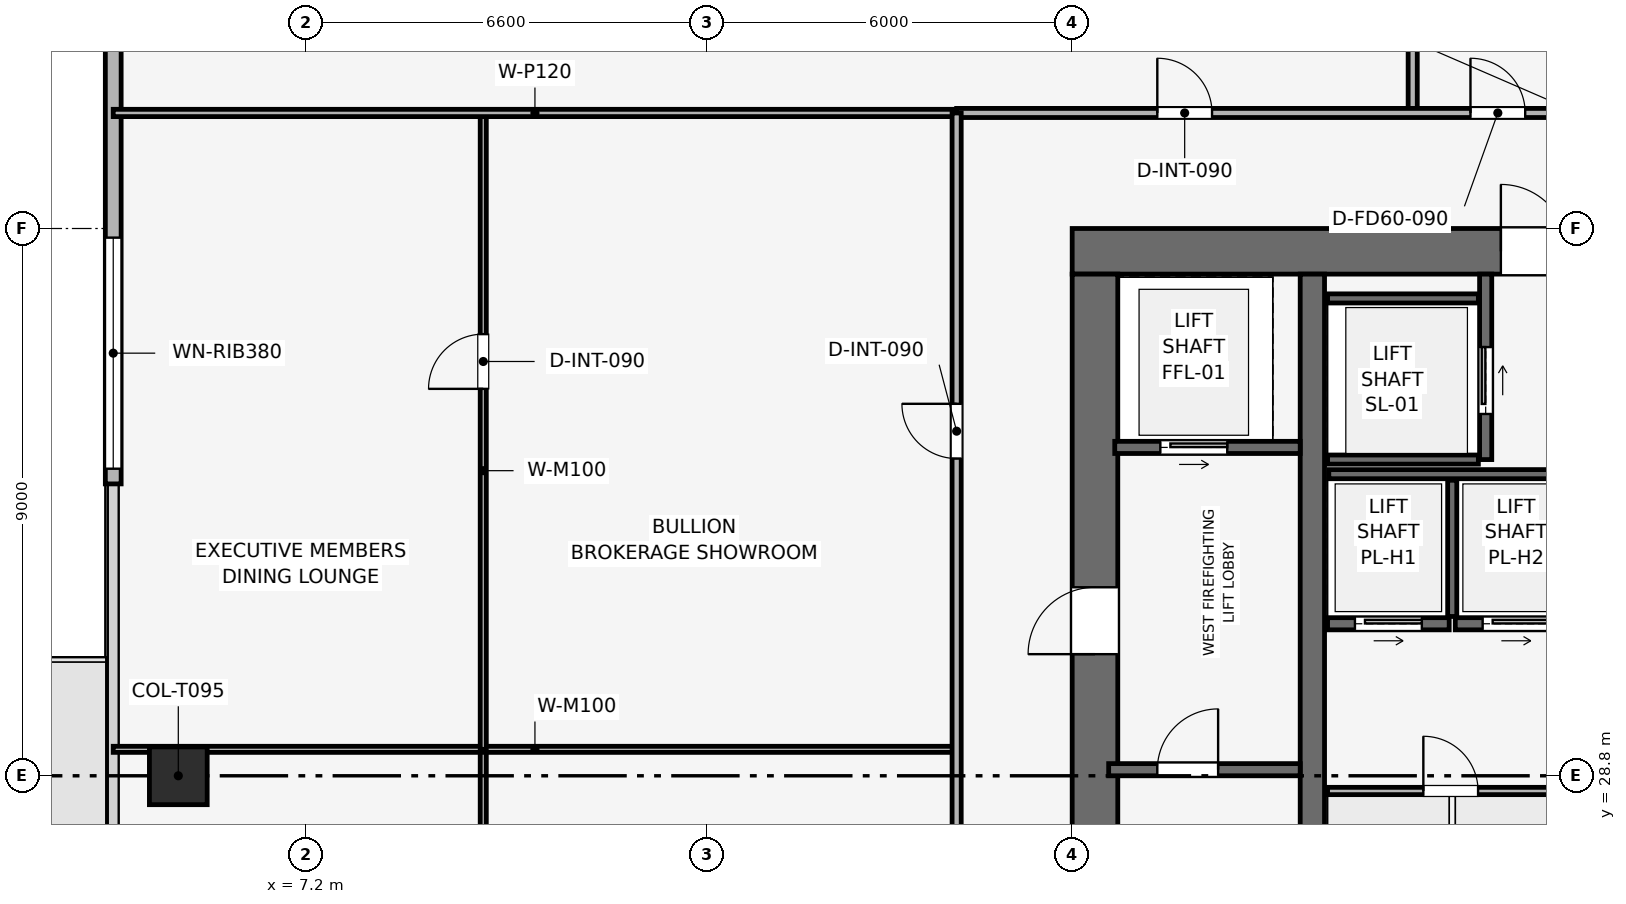
"""IFC4 building model, lengths in metres.
Left out: names, types, materials, properties, quantities, classifications, styles, units other than length and angle.
Written with IfcOpenShell. Run it as: python <this file> out.ifc"""

import sys

from ifc_helpers import new_model, si_unit, direction, frame, frame_2d, origin, origin_2d, place, context, subcontext, project, spatial, rectangle, extrude, element, fill, save


model = new_model("IFC4")
c1 = context("Model", 3, precision=1e-05, world=origin(), true_north=direction((0.0, 1.0)))
c2 = subcontext(c1, "Body", "Model", "MODEL_VIEW")
j1 = project(units=[si_unit("LENGTHUNIT", "METRE"), si_unit("PLANEANGLEUNIT", "RADIAN")], contexts=[c1])
p1 = place(None, origin())
s1 = spatial("IfcSite", under=j1, at=p1, CompositionType="ELEMENT")
p2 = place(p1, origin())
s2 = spatial("IfcBuilding", under=s1, at=p2, CompositionType="ELEMENT")
p3 = place(p2, frame((0.0, 0.0, 257.85)))
s3 = spatial("IfcBuildingStorey", under=s2, at=p3, CompositionType="ELEMENT", Elevation=257.85)
p4 = place(p3, frame((19.8, 37.425, 0.0), z_axis=(0.0, 0.0, 1.0), x_axis=(1.0, 0.0, 0.0)))
e1 = element("IfcWall", 1, at=p4, inside=s3, PredefinedType="SHEAR", context=c2, shape_type="SweptSolid", body=[
    extrude(rectangle(XDim=18.0, YDim=0.75, at=frame_2d((9.0, 0.0))), origin(), (0.0, 0.0, 1.0), 3.75),
])
p5 = place(p4, frame((7.05, 0.0, 0.0)))
e2 = element("IfcOpeningElement", 2, at=p5, cuts=e1, PredefinedType="OPENING", context=c2, shape_type="SweptSolid", body=[
    extrude(rectangle(XDim=1.1, YDim=2.15, at=frame_2d((0.55, 1.075))), frame((0.0, 0.385, 0.0), z_axis=(0.0, -1.0, 0.0), x_axis=(1.0, 0.0, 0.0)), (0.0, 0.0, 1.0), 0.77),
])
p6 = place(p3, frame((20.175, 20.55, 0.0), z_axis=(0.0, 0.0, 1.0), x_axis=(0.0, 1.0, 0.0)))
e3 = element("IfcWall", 3, at=p6, inside=s3, PredefinedType="SHEAR", context=c2, shape_type="SweptSolid", body=[
    extrude(rectangle(XDim=16.5, YDim=0.75, at=frame_2d((8.25, 0.0))), origin(), (0.0, 0.0, 1.0), 3.75),
])
p7 = place(p6, frame((10.25, 0.0, 0.0)))
e4 = element("IfcOpeningElement", 4, at=p7, cuts=e3, PredefinedType="OPENING", context=c2, shape_type="SweptSolid", body=[
    extrude(rectangle(XDim=1.1, YDim=2.15, at=frame_2d((0.55, 1.075))), frame((0.0, 0.385, 0.0), z_axis=(0.0, -1.0, 0.0), x_axis=(1.0, 0.0, 0.0)), (0.0, 0.0, 1.0), 0.77),
])
p8 = place(p3, frame((23.75, 20.55, 0.0), z_axis=(0.0, 0.0, 1.0), x_axis=(0.0, 1.0, 0.0)))
e5 = element("IfcWall", 5, at=p8, inside=s3, PredefinedType="SHEAR", context=c2, shape_type="SweptSolid", body=[
    extrude(rectangle(XDim=16.5, YDim=0.4, at=frame_2d((8.25, 0.0))), origin(), (0.0, 0.0, 1.0), 3.75),
])
p9 = place(p3, frame((5.1, 28.8, 0.003), z_axis=(0.0, 0.0, 1.0), x_axis=(1.0, 0.0, 0.0)))
e6 = element("IfcColumn", 6, at=p9, inside=s3, PredefinedType="COLUMN", context=c2, shape_type="SweptSolid", body=[
    extrude(rectangle(XDim=0.95, YDim=0.95, at=origin_2d()), origin(), (0.0, 0.0, 1.0), 3.494),
])
p10 = place(p3, frame((4.03, 33.6, 0.0), z_axis=(0.0, 0.0, 1.0), x_axis=(0.0, 1.0, 0.0)))
e7 = element("IfcWall", 7, at=p10, inside=s3, PredefinedType="SOLIDWALL", context=c2, shape_type="SweptSolid", body=[
    extrude(rectangle(XDim=13.2, YDim=0.26, at=frame_2d((6.6, 0.0))), origin(), (0.0, 0.0, 1.0), 3.5),
])
p11 = place(p10, frame((0.25, 0.0, 0.9)))
e8 = element("IfcOpeningElement", 8, at=p11, cuts=e7, PredefinedType="OPENING", context=c2, shape_type="SweptSolid", body=[
    extrude(rectangle(XDim=3.8, YDim=1.9, at=frame_2d((1.9, 0.95))), frame((0.0, 0.14, 0.0), z_axis=(0.0, -1.0, 0.0), x_axis=(1.0, 0.0, 0.0)), (0.0, 0.0, 1.0), 0.28),
])
p12 = place(p3, frame((20.4, 28.9, 0.0), z_axis=(0.0, 0.0, 1.0), x_axis=(1.0, 0.0, 0.0)))
e9 = element("IfcWall", 9, at=p12, inside=s3, PredefinedType="SHEAR", context=c2, shape_type="SweptSolid", body=[
    extrude(rectangle(XDim=3.15, YDim=0.2, at=frame_2d((1.575, 0.0))), origin(), (0.0, 0.0, 1.0), 3.5),
])
p13 = place(p12, frame((0.8, 0.0, 0.0)))
e10 = element("IfcOpeningElement", 10, at=p13, cuts=e9, PredefinedType="OPENING", context=c2, shape_type="SweptSolid", body=[
    extrude(rectangle(XDim=1.0, YDim=2.1, at=frame_2d((0.5, 1.05))), frame((0.0, 0.11, 0.0), z_axis=(0.0, -1.0, 0.0), x_axis=(1.0, 0.0, 0.0)), (0.0, 0.0, 1.0), 0.22),
])
p14 = place(p3, frame((20.5, 34.2, 0.0), z_axis=(0.0, 0.0, 1.0), x_axis=(1.0, 0.0, 0.0)))
e11 = element("IfcWall", 11, at=p14, inside=s3, PredefinedType="SHEAR", context=c2, shape_type="SweptSolid", body=[
    extrude(rectangle(XDim=3.05, YDim=0.2, at=frame_2d((1.525, 0.0))), origin(), (0.0, 0.0, 1.0), 3.5),
])
p15 = place(p14, frame((0.75, 0.0, 0.0)))
e12 = element("IfcOpeningElement", 12, at=p15, cuts=e11, PredefinedType="OPENING", context=c2, shape_type="SweptSolid", body=[
    extrude(rectangle(XDim=1.1, YDim=2.15, at=frame_2d((0.55, 1.075))), frame((0.0, 0.11, 0.0), z_axis=(0.0, -1.0, 0.0), x_axis=(1.0, 0.0, 0.0)), (0.0, 0.0, 1.0), 0.22),
])
p16 = place(p3, frame((26.6, 34.0, 0.0), z_axis=(0.0, 0.0, 1.0), x_axis=(0.0, 1.0, 0.0)))
e13 = element("IfcWall", 13, at=p16, inside=s3, PredefinedType="SHEAR", context=c2, shape_type="SweptSolid", body=[
    extrude(rectangle(XDim=3.05, YDim=0.2, at=frame_2d((1.525, 0.0))), origin(), (0.0, 0.0, 1.0), 3.5),
])
p17 = place(p16, frame((0.75, 0.0, 0.0)))
e14 = element("IfcOpeningElement", 14, at=p17, cuts=e13, PredefinedType="OPENING", context=c2, shape_type="SweptSolid", body=[
    extrude(rectangle(XDim=1.1, YDim=2.15, at=frame_2d((0.55, 1.075))), frame((0.0, 0.11, 0.0), z_axis=(0.0, -1.0, 0.0), x_axis=(1.0, 0.0, 0.0)), (0.0, 0.0, 1.0), 0.22),
])
for number, where, z_axis, x_axis in (
    (15, (24.0, 34.0, 0.0), (0.0, 0.0, 1.0), (1.0, 0.0, 0.0)),
    (16, (24.0, 36.65, 0.0), (0.0, 0.0, 1.0), (1.0, 0.0, 0.0)),
):
    element("IfcWall", number, at=place(p3, frame(where, z_axis=z_axis, x_axis=x_axis)), inside=s3, PredefinedType="SHEAR", context=c2, shape_type="SweptSolid", body=[
        extrude(rectangle(XDim=2.48, YDim=0.15, at=frame_2d((1.24, 0.0))), origin(), (0.0, 0.0, 1.0), 3.5),
    ])
p18 = place(p3, frame((24.0, 31.3, 0.0), z_axis=(0.0, 0.0, 1.0), x_axis=(1.0, 0.0, 0.0)))
e17 = element("IfcWall", 17, at=p18, inside=s3, PredefinedType="SHEAR", context=c2, shape_type="SweptSolid", body=[
    extrude(rectangle(XDim=2.0, YDim=0.2, at=frame_2d((1.0, 0.0))), origin(), (0.0, 0.0, 1.0), 3.5),
])
p19 = place(p18, frame((0.45, 0.0, 0.0)))
e18 = element("IfcOpeningElement", 18, at=p19, cuts=e17, PredefinedType="OPENING", context=c2, shape_type="SweptSolid", body=[
    extrude(rectangle(XDim=1.1, YDim=2.15, at=frame_2d((0.55, 1.075))), frame((0.0, 0.11, 0.0), z_axis=(0.0, -1.0, 0.0), x_axis=(1.0, 0.0, 0.0)), (0.0, 0.0, 1.0), 0.22),
])
p20 = place(p3, frame((26.1, 31.3, 0.0), z_axis=(0.0, 0.0, 1.0), x_axis=(1.0, 0.0, 0.0)))
e19 = element("IfcWall", 19, at=p20, inside=s3, PredefinedType="SHEAR", context=c2, shape_type="SweptSolid", body=[
    extrude(rectangle(XDim=2.0, YDim=0.2, at=frame_2d((1.0, 0.0))), origin(), (0.0, 0.0, 1.0), 3.5),
])
p21 = place(p20, frame((0.45, 0.0, 0.0)))
e20 = element("IfcOpeningElement", 20, at=p21, cuts=e19, PredefinedType="OPENING", context=c2, shape_type="SweptSolid", body=[
    extrude(rectangle(XDim=1.1, YDim=2.15, at=frame_2d((0.55, 1.075))), frame((0.0, 0.11, 0.0), z_axis=(0.0, -1.0, 0.0), x_axis=(1.0, 0.0, 0.0)), (0.0, 0.0, 1.0), 0.22),
])
p22 = place(p3, frame((24.02, 33.76, 0.0), z_axis=(0.0, 0.0, 1.0), x_axis=(1.0, 0.0, 0.0)))
e21 = element("IfcWall", 21, at=p22, inside=s3, PredefinedType="SHEAR", context=c2, shape_type="SweptSolid", body=[
    extrude(rectangle(XDim=4.08, YDim=0.15, at=frame_2d((2.04, 0.0))), origin(), (0.0, 0.0, 1.0), 3.5),
])
p23 = place(p3, frame((26.05, 31.42, 0.0), z_axis=(0.0, 0.0, 1.0), x_axis=(0.0, 1.0, 0.0)))
e22 = element("IfcWall", 22, at=p23, inside=s3, PredefinedType="SHEAR", context=c2, shape_type="SweptSolid", body=[
    extrude(rectangle(XDim=2.24, YDim=0.15, at=frame_2d((1.12, 0.0))), origin(), (0.0, 0.0, 1.0), 3.5),
])
p24 = place(p3, frame((24.0, 28.55, 0.0), z_axis=(0.0, 0.0, 1.0), x_axis=(1.0, 0.0, 0.0)))
e23 = element("IfcWall", 23, at=p24, inside=s3, PredefinedType="PARTITIONING", context=c2, shape_type="SweptSolid", body=[
    extrude(rectangle(XDim=4.05, YDim=0.12, at=frame_2d((2.025, 0.0))), origin(), (0.0, 0.0, 1.0), 3.5),
])
p25 = place(p24, frame((1.575, 0.0, 0.0)))
e24 = element("IfcOpeningElement", 24, at=p25, cuts=e23, PredefinedType="OPENING", context=c2, shape_type="SweptSolid", body=[
    extrude(rectangle(XDim=0.9, YDim=2.1, at=frame_2d((0.45, 1.05))), frame((0.0, 0.07, 0.0), z_axis=(0.0, -1.0, 0.0), x_axis=(1.0, 0.0, 0.0)), (0.0, 0.0, 1.0), 0.14),
])
p26 = place(p3, frame((25.4, 39.7, 0.0), z_axis=(0.0, 0.0, 1.0), x_axis=(0.0, 1.0, 0.0)))
e25 = element("IfcWall", 25, at=p26, inside=s3, PredefinedType="PARTITIONING", context=c2, shape_type="SweptSolid", body=[
    extrude(rectangle(XDim=13.87, YDim=0.15, at=frame_2d((6.935, 0.0))), origin(), (0.0, 0.0, 1.0), 3.085),
])
p27 = place(p26, frame((8.035, 0.0, 0.0)))
e26 = element("IfcOpeningElement", 26, at=p27, cuts=e25, PredefinedType="OPENING", context=c2, shape_type="SweptSolid", body=[
    extrude(rectangle(XDim=0.9, YDim=2.1, at=frame_2d((0.45, 1.05))), frame((0.0, 0.085, 0.0), z_axis=(0.0, -1.0, 0.0), x_axis=(1.0, 0.0, 0.0)), (0.0, 0.0, 1.0), 0.17),
])
p28 = place(p3, frame((10.115, 21.304, 0.0), z_axis=(0.0, 0.0, 1.0), x_axis=(0.0, 1.0, 0.0)))
e27 = element("IfcWall", 27, at=p28, inside=s3, PredefinedType="MOVABLE", context=c2, shape_type="SweptSolid", body=[
    extrude(rectangle(XDim=7.931, YDim=0.1, at=frame_2d((3.966, 0.0))), origin(), (0.0, 0.0, 1.0), 3.085),
])
p29 = place(p28, frame((0.2, 0.0, 0.0)))
e28 = element("IfcOpeningElement", 28, at=p29, cuts=e27, PredefinedType="OPENING", context=c2, shape_type="SweptSolid", body=[
    extrude(rectangle(XDim=0.9, YDim=2.1, at=frame_2d((0.45, 1.05))), frame((0.0, 0.06, 0.0), z_axis=(0.0, -1.0, 0.0), x_axis=(1.0, 0.0, 0.0)), (0.0, 0.0, 1.0), 0.12),
])
p30 = place(p3, frame((4.03, 29.235, 0.0), z_axis=(0.0, 0.0, 1.0), x_axis=(1.0, 0.0, 0.0)))
e29 = element("IfcWall", 29, at=p30, inside=s3, PredefinedType="MOVABLE", context=c2, shape_type="SweptSolid", body=[
    extrude(rectangle(XDim=13.87, YDim=0.1, at=frame_2d((6.935, 0.0))), origin(), (0.0, 0.0, 1.0), 3.085),
])
p31 = place(p3, frame((10.115, 29.235, 0.0), z_axis=(0.0, 0.0, 1.0), x_axis=(0.0, 1.0, 0.0)))
e30 = element("IfcWall", 30, at=p31, inside=s3, PredefinedType="MOVABLE", context=c2, shape_type="SweptSolid", body=[
    extrude(rectangle(XDim=10.465, YDim=0.1, at=frame_2d((5.232, 0.0))), origin(), (0.0, 0.0, 1.0), 3.085),
])
p32 = place(p31, frame((5.928, 0.0, 0.0)))
e31 = element("IfcOpeningElement", 31, at=p32, cuts=e30, PredefinedType="OPENING", context=c2, shape_type="SweptSolid", body=[
    extrude(rectangle(XDim=0.9, YDim=2.1, at=frame_2d((0.45, 1.05))), frame((0.0, 0.06, 0.0), z_axis=(0.0, -1.0, 0.0), x_axis=(1.0, 0.0, 0.0)), (0.0, 0.0, 1.0), 0.12),
])
p33 = place(p3, frame((4.03, 39.7, 0.0), z_axis=(0.0, 0.0, 1.0), x_axis=(1.0, 0.0, 0.0)))
e32 = element("IfcWall", 32, at=p33, inside=s3, PredefinedType="PARTITIONING", context=c2, shape_type="SweptSolid", body=[
    extrude(rectangle(XDim=13.87, YDim=0.12, at=frame_2d((6.935, 0.0))), origin(), (0.0, 0.0, 1.0), 3.085),
])
p34 = place(p3, frame((17.9, 39.7, 0.0), z_axis=(0.0, 0.0, 1.0), x_axis=(1.0, 0.0, 0.0)))
e33 = element("IfcWall", 33, at=p34, inside=s3, PredefinedType="PARTITIONING", context=c2, shape_type="SweptSolid", body=[
    extrude(rectangle(XDim=21.8, YDim=0.15, at=frame_2d((10.9, 0.0))), origin(), (0.0, 0.0, 1.0), 3.085),
])
p35 = place(p34, frame((3.3, 0.0, 0.0)))
e34 = element("IfcOpeningElement", 34, at=p35, cuts=e33, PredefinedType="OPENING", context=c2, shape_type="SweptSolid", body=[
    extrude(rectangle(XDim=0.9, YDim=2.1, at=frame_2d((0.45, 1.05))), frame((0.0, 0.085, 0.0), z_axis=(0.0, -1.0, 0.0), x_axis=(1.0, 0.0, 0.0)), (0.0, 0.0, 1.0), 0.17),
])
p36 = place(p34, frame((8.45, 0.0, 0.0)))
e35 = element("IfcOpeningElement", 35, at=p36, cuts=e33, PredefinedType="OPENING", context=c2, shape_type="SweptSolid", body=[
    extrude(rectangle(XDim=0.9, YDim=2.1, at=frame_2d((0.45, 1.05))), frame((0.0, 0.085, 0.0), z_axis=(0.0, -1.0, 0.0), x_axis=(1.0, 0.0, 0.0)), (0.0, 0.0, 1.0), 0.17),
])
p37 = place(p34, frame((11.35, 0.0, 0.0)))
e36 = element("IfcOpeningElement", 36, at=p37, cuts=e33, PredefinedType="OPENING", context=c2, shape_type="SweptSolid", body=[
    extrude(rectangle(XDim=0.9, YDim=2.1, at=frame_2d((0.45, 1.05))), frame((0.0, 0.085, 0.0), z_axis=(0.0, -1.0, 0.0), x_axis=(1.0, 0.0, 0.0)), (0.0, 0.0, 1.0), 0.17),
])
p38 = place(p34, frame((14.1, 0.0, 0.0)))
e37 = element("IfcOpeningElement", 37, at=p38, cuts=e33, PredefinedType="OPENING", context=c2, shape_type="SweptSolid", body=[
    extrude(rectangle(XDim=0.95, YDim=2.1, at=frame_2d((0.475, 1.05))), frame((0.0, 0.085, 0.0), z_axis=(0.0, -1.0, 0.0), x_axis=(1.0, 0.0, 0.0)), (0.0, 0.0, 1.0), 0.17),
])
p39 = place(p34, frame((18.4, 0.0, 0.0)))
e38 = element("IfcOpeningElement", 38, at=p39, cuts=e33, PredefinedType="OPENING", context=c2, shape_type="SweptSolid", body=[
    extrude(rectangle(XDim=0.9, YDim=2.1, at=frame_2d((0.45, 1.05))), frame((0.0, 0.085, 0.0), z_axis=(0.0, -1.0, 0.0), x_axis=(1.0, 0.0, 0.0)), (0.0, 0.0, 1.0), 0.17),
])
p40 = place(p3, frame((17.9, 10.8, 0.0), z_axis=(0.0, 0.0, 1.0), x_axis=(0.0, 1.0, 0.0)))
e39 = element("IfcWall", 39, at=p40, inside=s3, PredefinedType="PARTITIONING", context=c2, shape_type="SweptSolid", body=[
    extrude(rectangle(XDim=28.9, YDim=0.15, at=frame_2d((14.45, 0.0))), origin(), (0.0, 0.0, 1.0), 3.085),
])
p41 = place(p40, frame((0.7, 0.0, 0.0)))
e40 = element("IfcOpeningElement", 40, at=p41, cuts=e39, PredefinedType="OPENING", context=c2, shape_type="SweptSolid", body=[
    extrude(rectangle(XDim=0.9, YDim=2.1, at=frame_2d((0.45, 1.05))), frame((0.0, 0.085, 0.0), z_axis=(0.0, -1.0, 0.0), x_axis=(1.0, 0.0, 0.0)), (0.0, 0.0, 1.0), 0.17),
])
p42 = place(p40, frame((5.952, 0.0, 0.0)))
e41 = element("IfcOpeningElement", 41, at=p42, cuts=e39, PredefinedType="OPENING", context=c2, shape_type="SweptSolid", body=[
    extrude(rectangle(XDim=0.9, YDim=2.1, at=frame_2d((0.45, 1.05))), frame((0.0, 0.085, 0.0), z_axis=(0.0, -1.0, 0.0), x_axis=(1.0, 0.0, 0.0)), (0.0, 0.0, 1.0), 0.17),
])
p43 = place(p40, frame((14.02, 0.0, 0.0)))
e42 = element("IfcOpeningElement", 42, at=p43, cuts=e39, PredefinedType="OPENING", context=c2, shape_type="SweptSolid", body=[
    extrude(rectangle(XDim=0.9, YDim=2.1, at=frame_2d((0.45, 1.05))), frame((0.0, 0.085, 0.0), z_axis=(0.0, -1.0, 0.0), x_axis=(1.0, 0.0, 0.0)), (0.0, 0.0, 1.0), 0.17),
])
p44 = place(p40, frame((23.217, 0.0, 0.0)))
e43 = element("IfcOpeningElement", 43, at=p44, cuts=e39, PredefinedType="OPENING", context=c2, shape_type="SweptSolid", body=[
    extrude(rectangle(XDim=0.9, YDim=2.1, at=frame_2d((0.45, 1.05))), frame((0.0, 0.085, 0.0), z_axis=(0.0, -1.0, 0.0), x_axis=(1.0, 0.0, 0.0)), (0.0, 0.0, 1.0), 0.17),
])
p45 = place(p11, origin())
e44 = element("IfcWindow", 44, at=p45, inside=s3, PartitioningType="SINGLE_PANEL", PredefinedType="WINDOW", context=c2, shape_type="SweptSolid", body=[
    extrude(rectangle(XDim=3.8, YDim=1.9, at=frame_2d((1.9, 0.95))), frame((0.0, 0.03, 0.0), z_axis=(0.0, -1.0, 0.0), x_axis=(1.0, 0.0, 0.0)), (0.0, 0.0, 1.0), 0.06),
])
fill(e8, e44)
p46 = place(p13, origin())
e45 = element("IfcDoor", 45, at=p46, inside=s3, OperationType="SINGLE_SWING_RIGHT", PredefinedType="DOOR", context=c2, shape_type="SweptSolid", body=[
    extrude(rectangle(XDim=1.0, YDim=2.1, at=frame_2d((0.5, 1.05))), frame((0.0, 0.025, 0.0), z_axis=(0.0, -1.0, 0.0), x_axis=(1.0, 0.0, 0.0)), (0.0, 0.0, 1.0), 0.05),
])
fill(e10, e45)
p47 = place(p15, origin())
e46 = element("IfcDoor", 46, at=p47, inside=s3, OperationType="SLIDING_TO_RIGHT", PredefinedType="DOOR", context=c2, shape_type="SweptSolid", body=[
    extrude(rectangle(XDim=1.1, YDim=2.15, at=frame_2d((0.55, 1.075))), frame((0.0, 0.025, 0.0), z_axis=(0.0, -1.0, 0.0), x_axis=(1.0, 0.0, 0.0)), (0.0, 0.0, 1.0), 0.05),
])
fill(e12, e46)
p48 = place(p17, origin())
e47 = element("IfcDoor", 47, at=p48, inside=s3, OperationType="SLIDING_TO_RIGHT", PredefinedType="DOOR", context=c2, shape_type="SweptSolid", body=[
    extrude(rectangle(XDim=1.1, YDim=2.15, at=frame_2d((0.55, 1.075))), frame((0.0, 0.025, 0.0), z_axis=(0.0, -1.0, 0.0), x_axis=(1.0, 0.0, 0.0)), (0.0, 0.0, 1.0), 0.05),
])
fill(e14, e47)
p49 = place(p19, origin())
e48 = element("IfcDoor", 48, at=p49, inside=s3, OperationType="SLIDING_TO_RIGHT", PredefinedType="DOOR", context=c2, shape_type="SweptSolid", body=[
    extrude(rectangle(XDim=1.1, YDim=2.15, at=frame_2d((0.55, 1.075))), frame((0.0, 0.025, 0.0), z_axis=(0.0, -1.0, 0.0), x_axis=(1.0, 0.0, 0.0)), (0.0, 0.0, 1.0), 0.05),
])
fill(e18, e48)
p50 = place(p21, origin())
e49 = element("IfcDoor", 49, at=p50, inside=s3, OperationType="SLIDING_TO_RIGHT", PredefinedType="DOOR", context=c2, shape_type="SweptSolid", body=[
    extrude(rectangle(XDim=1.1, YDim=2.15, at=frame_2d((0.55, 1.075))), frame((0.0, 0.025, 0.0), z_axis=(0.0, -1.0, 0.0), x_axis=(1.0, 0.0, 0.0)), (0.0, 0.0, 1.0), 0.05),
])
fill(e20, e49)
p51 = place(p25, origin())
e50 = element("IfcDoor", 50, at=p51, inside=s3, OperationType="SINGLE_SWING_LEFT", PredefinedType="DOOR", context=c2, shape_type="SweptSolid", body=[
    extrude(rectangle(XDim=0.9, YDim=2.1, at=frame_2d((0.45, 1.05))), frame((0.0, 0.025, 0.0), z_axis=(0.0, -1.0, 0.0), x_axis=(1.0, 0.0, 0.0)), (0.0, 0.0, 1.0), 0.05),
])
fill(e24, e50)
p52 = place(p32, origin())
e51 = element("IfcDoor", 51, at=p52, inside=s3, OperationType="SINGLE_SWING_LEFT", PredefinedType="DOOR", context=c2, shape_type="SweptSolid", body=[
    extrude(rectangle(XDim=0.9, YDim=2.1, at=frame_2d((0.45, 1.05))), frame((0.0, 0.025, 0.0), z_axis=(0.0, -1.0, 0.0), x_axis=(1.0, 0.0, 0.0)), (0.0, 0.0, 1.0), 0.05),
])
fill(e31, e51)
p53 = place(p35, origin())
e52 = element("IfcDoor", 52, at=p53, inside=s3, OperationType="SINGLE_SWING_LEFT", PredefinedType="DOOR", context=c2, shape_type="SweptSolid", body=[
    extrude(rectangle(XDim=0.9, YDim=2.1, at=frame_2d((0.45, 1.05))), frame((0.0, 0.025, 0.0), z_axis=(0.0, -1.0, 0.0), x_axis=(1.0, 0.0, 0.0)), (0.0, 0.0, 1.0), 0.05),
])
fill(e34, e52)
p54 = place(p36, origin())
e53 = element("IfcDoor", 53, at=p54, inside=s3, OperationType="SINGLE_SWING_LEFT", PredefinedType="DOOR", context=c2, shape_type="SweptSolid", body=[
    extrude(rectangle(XDim=0.9, YDim=2.1, at=frame_2d((0.45, 1.05))), frame((0.0, 0.025, 0.0), z_axis=(0.0, -1.0, 0.0), x_axis=(1.0, 0.0, 0.0)), (0.0, 0.0, 1.0), 0.05),
])
fill(e35, e53)
p55 = place(p44, origin())
e54 = element("IfcDoor", 54, at=p55, inside=s3, OperationType="SINGLE_SWING_RIGHT", PredefinedType="DOOR", context=c2, shape_type="SweptSolid", body=[
    extrude(rectangle(XDim=0.9, YDim=2.1, at=frame_2d((0.45, 1.05))), frame((0.0, 0.025, 0.0), z_axis=(0.0, -1.0, 0.0), x_axis=(1.0, 0.0, 0.0)), (0.0, 0.0, 1.0), 0.05),
])
fill(e43, e54)
p56 = place(p7, origin())
e55 = element("IfcDoor", 55, at=p56, inside=s3, OperationType="SINGLE_SWING_LEFT", PredefinedType="DOOR", context=c2, shape_type="SweptSolid", body=[
    extrude(rectangle(XDim=1.1, YDim=2.15, at=frame_2d((0.55, 1.075))), frame((0.0, 0.025, 0.0), z_axis=(0.0, -1.0, 0.0), x_axis=(1.0, 0.0, 0.0)), (0.0, 0.0, 1.0), 0.05),
])
fill(e4, e55)
p57 = place(p5, origin())
e56 = element("IfcDoor", 56, at=p57, inside=s3, OperationType="SINGLE_SWING_LEFT", PredefinedType="DOOR", context=c2, shape_type="SweptSolid", body=[
    extrude(rectangle(XDim=1.1, YDim=2.15, at=frame_2d((0.55, 1.075))), frame((0.0, 0.025, 0.0), z_axis=(0.0, -1.0, 0.0), x_axis=(1.0, 0.0, 0.0)), (0.0, 0.0, 1.0), 0.05),
])
fill(e2, e56)
save(model, sys.argv[1])
